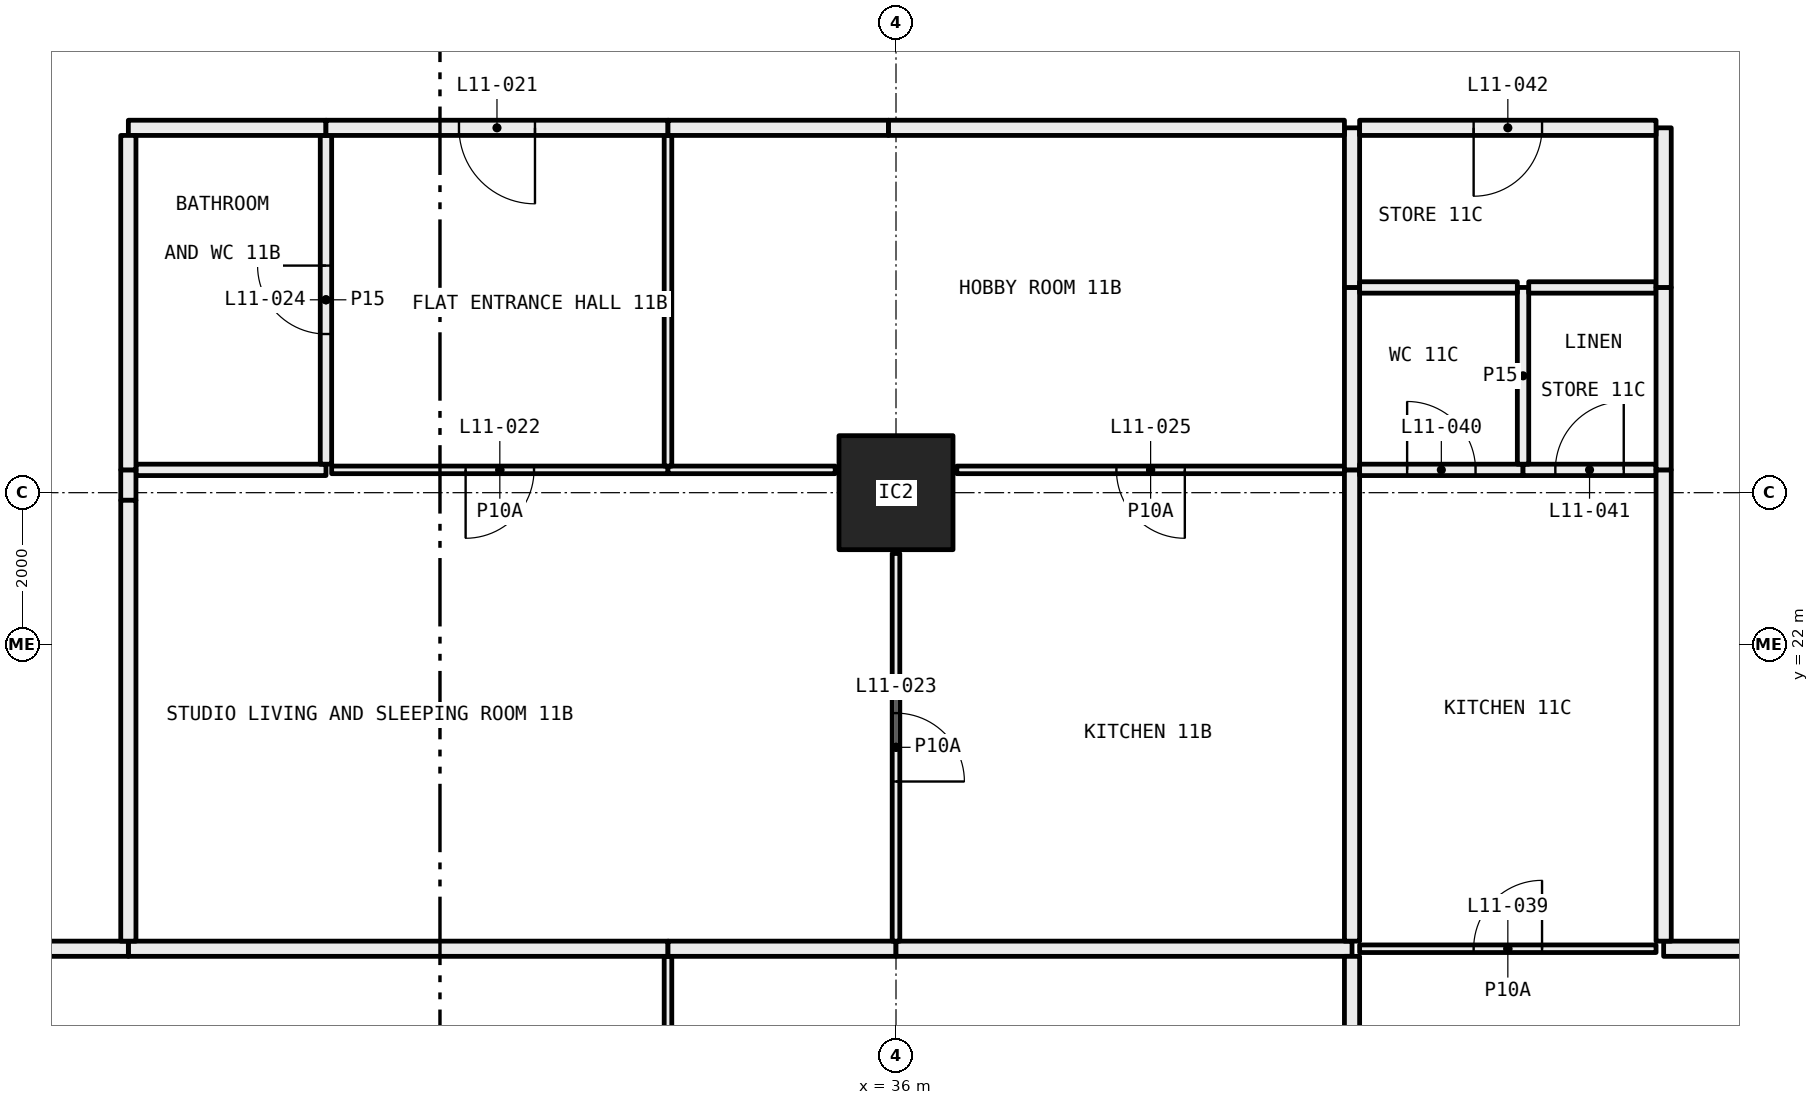
"""IFC4 building model, lengths in metres.
Left out: names, types, materials, properties, quantities, classifications, styles, units other than length and angle.
Written with IfcOpenShell. Run it as: python <this file> out.ifc"""

import sys

from ifc_helpers import new_model, si_unit, direction, frame, frame_2d, origin, origin_2d, place, context, subcontext, project, spatial, rectangle, hollow_rectangle, extrude, element, fill, save


model = new_model("IFC4")
c1 = context("Model", 3, precision=1e-05, world=origin(), true_north=direction((0.0, 1.0)))
c2 = subcontext(c1, "Body", "Model", "MODEL_VIEW")
j1 = project(units=[si_unit("LENGTHUNIT", "METRE"), si_unit("PLANEANGLEUNIT", "RADIAN")], contexts=[c1])
p1 = place(None, origin())
s1 = spatial("IfcSite", under=j1, at=p1, CompositionType="ELEMENT")
p2 = place(p1, origin())
s2 = spatial("IfcBuilding", under=s1, at=p2, CompositionType="ELEMENT")
p3 = place(p2, frame((0.0, 0.0, 50.7)))
s3 = spatial("IfcBuildingStorey", under=s2, at=p3, CompositionType="ELEMENT", Elevation=50.7)
p4 = place(p3, frame((36.0, 24.0, 0.0), z_axis=(0.0, 0.0, 1.0), x_axis=(1.0, 0.0, 0.0)))
e1 = element("IfcColumn", 1, at=p4, inside=s3, PredefinedType="COLUMN", context=c2, shape_type="SweptSolid", body=[
    extrude(hollow_rectangle(XDim=1.5, YDim=1.5, WallThickness=0.065, at=origin_2d()), origin(), (0.0, 0.0, 1.0), 3.05),
])
p5 = place(p3, frame((33.0, 12.05, 0.0), z_axis=(0.0, 0.0, 1.0), x_axis=(0.0, 1.0, 0.0)))
e2 = element("IfcWall", 2, at=p5, inside=s3, PredefinedType="PARTITIONING", context=c2, shape_type="SweptSolid", body=[
    extrude(rectangle(XDim=5.85, YDim=0.1, at=frame_2d((2.925, 0.0))), origin(), (0.0, 0.0, 1.0), 2.45),
])
p6 = place(p3, frame((33.0, 18.0, 0.0), z_axis=(0.0, 0.0, 1.0), x_axis=(-1.0, 0.0, 0.0)))
e3 = element("IfcWall", 3, at=p6, inside=s3, PredefinedType="PARTITIONING", context=c2, shape_type="SweptSolid", body=[
    extrude(rectangle(XDim=7.1, YDim=0.2, at=frame_2d((3.55, 0.0))), origin(), (0.0, 0.0, 1.0), 3.05),
])
p7 = place(p3, frame((25.9, 18.0, 0.0), z_axis=(0.0, 0.0, 1.0), x_axis=(-1.0, 0.0, 0.0)))
e4 = element("IfcWall", 4, at=p7, inside=s3, PredefinedType="PARTITIONING", context=c2, shape_type="SweptSolid", body=[
    extrude(rectangle(XDim=1.9, YDim=0.2, at=frame_2d((0.95, 0.0))), origin(), (0.0, 0.0, 1.0), 3.05),
])
p8 = place(p3, frame((36.0, 18.0, 0.0), z_axis=(0.0, 0.0, 1.0), x_axis=(-1.0, 0.0, 0.0)))
e5 = element("IfcWall", 5, at=p8, inside=s3, PredefinedType="PARTITIONING", context=c2, shape_type="SweptSolid", body=[
    extrude(rectangle(XDim=3.0, YDim=0.2, at=frame_2d((1.5, 0.0))), origin(), (0.0, 0.0, 1.0), 2.45),
])
p9 = place(p3, frame((42.0, 18.0, 0.0), z_axis=(0.0, 0.0, 1.0), x_axis=(-1.0, 0.0, 0.0)))
e6 = element("IfcWall", 6, at=p9, inside=s3, PredefinedType="PARTITIONING", context=c2, shape_type="SweptSolid", body=[
    extrude(rectangle(XDim=6.0, YDim=0.2, at=frame_2d((3.0, 0.0))), origin(), (0.0, 0.0, 1.0), 2.45),
])
p10 = place(p3, frame((42.0, 12.0, 0.0), z_axis=(0.0, 0.0, 1.0), x_axis=(0.0, 1.0, 0.0)))
e7 = element("IfcWall", 7, at=p10, inside=s3, PredefinedType="PARTITIONING", context=c2, shape_type="SweptSolid", body=[
    extrude(rectangle(XDim=5.9, YDim=0.2, at=frame_2d((2.95, 0.0))), origin(), (0.0, 0.0, 1.0), 2.45),
])
p11 = place(p3, frame((36.0, 18.1, 0.0), z_axis=(0.0, 0.0, 1.0), x_axis=(0.0, 1.0, 0.0)))
e8 = element("IfcWall", 8, at=p11, inside=s3, PredefinedType="PARTITIONING", context=c2, shape_type="SweptSolid", body=[
    extrude(rectangle(XDim=5.1, YDim=0.1, at=frame_2d((2.55, 0.0))), origin(), (0.0, 0.0, 1.0), 2.45),
])
p12 = place(p11, frame((2.1, 0.0, 0.0)))
e9 = element("IfcOpeningElement", 9, at=p12, cuts=e8, PredefinedType="OPENING", context=c2, shape_type="SweptSolid", body=[
    extrude(rectangle(XDim=0.9, YDim=2.1, at=frame_2d((0.45, 1.05))), frame((0.0, 0.06, 0.0), z_axis=(0.0, -1.0, 0.0), x_axis=(1.0, 0.0, 0.0)), (0.0, 0.0, 1.0), 0.12),
])
p13 = place(p3, frame((28.5, 24.3, 0.0), z_axis=(0.0, 0.0, 1.0), x_axis=(-1.0, 0.0, 0.0)))
e10 = element("IfcWall", 10, at=p13, inside=s3, PredefinedType="PARTITIONING", context=c2, shape_type="SweptSolid", body=[
    extrude(rectangle(XDim=2.5, YDim=0.15, at=frame_2d((1.25, 0.0))), origin(), (0.0, 0.0, 1.0), 3.05),
])
p14 = place(p3, frame((33.0, 24.3, 0.0), z_axis=(0.0, 0.0, 1.0), x_axis=(-1.0, 0.0, 0.0)))
e11 = element("IfcWall", 11, at=p14, inside=s3, PredefinedType="PARTITIONING", context=c2, shape_type="SweptSolid", body=[
    extrude(rectangle(XDim=4.425, YDim=0.1, at=frame_2d((2.212, 0.0))), origin(), (0.0, 0.0, 1.0), 3.05),
])
p15 = place(p14, frame((1.762, 0.0, 0.0)))
e12 = element("IfcOpeningElement", 12, at=p15, cuts=e11, PredefinedType="OPENING", context=c2, shape_type="SweptSolid", body=[
    extrude(rectangle(XDim=0.9, YDim=2.1, at=frame_2d((0.45, 1.05))), frame((0.0, 0.06, 0.0), z_axis=(0.0, -1.0, 0.0), x_axis=(1.0, 0.0, 0.0)), (0.0, 0.0, 1.0), 0.12),
])
p16 = place(p3, frame((35.2, 24.3, 0.0), z_axis=(0.0, 0.0, 1.0), x_axis=(-1.0, 0.0, 0.0)))
e13 = element("IfcWall", 13, at=p16, inside=s3, PredefinedType="PARTITIONING", context=c2, shape_type="SweptSolid", body=[
    extrude(rectangle(XDim=2.2, YDim=0.1, at=frame_2d((1.1, 0.0))), origin(), (0.0, 0.0, 1.0), 3.05),
])
p17 = place(p3, frame((25.9, 24.3, 0.0), z_axis=(0.0, 0.0, 1.0), x_axis=(0.0, -1.0, 0.0)))
e14 = element("IfcWall", 14, at=p17, inside=s3, PredefinedType="PARTITIONING", context=c2, shape_type="SweptSolid", body=[
    extrude(rectangle(XDim=0.4, YDim=0.2, at=frame_2d((0.2, 0.0))), origin(), (0.0, 0.0, 1.0), 2.45),
])
p18 = place(p3, frame((25.9, 23.9, 0.0), z_axis=(0.0, 0.0, 1.0), x_axis=(0.0, -1.0, 0.0)))
e15 = element("IfcWall", 15, at=p18, inside=s3, PredefinedType="PARTITIONING", context=c2, shape_type="SweptSolid", body=[
    extrude(rectangle(XDim=5.8, YDim=0.2, at=frame_2d((2.9, 0.0))), origin(), (0.0, 0.0, 1.0), 3.05),
])
p19 = place(p3, frame((41.9, 24.3, 0.0), z_axis=(0.0, 0.0, 1.0), x_axis=(-1.0, 0.0, 0.0)))
e16 = element("IfcWall", 16, at=p19, inside=s3, PredefinedType="PARTITIONING", context=c2, shape_type="SweptSolid", body=[
    extrude(rectangle(XDim=5.1, YDim=0.1, at=frame_2d((2.55, 0.0))), origin(), (0.0, 0.0, 1.0), 3.05),
])
p20 = place(p19, frame((2.1, 0.0, 0.0)))
e17 = element("IfcOpeningElement", 17, at=p20, cuts=e16, PredefinedType="OPENING", context=c2, shape_type="SweptSolid", body=[
    extrude(rectangle(XDim=0.9, YDim=2.1, at=frame_2d((0.45, 1.05))), frame((0.0, 0.06, 0.0), z_axis=(0.0, -1.0, 0.0), x_axis=(1.0, 0.0, 0.0)), (0.0, 0.0, 1.0), 0.12),
])
p21 = place(p3, frame((42.0, 18.1, 0.0), z_axis=(0.0, 0.0, 1.0), x_axis=(0.0, 1.0, 0.0)))
e18 = element("IfcWall", 18, at=p21, inside=s3, PredefinedType="PARTITIONING", context=c2, shape_type="SweptSolid", body=[
    extrude(rectangle(XDim=6.2, YDim=0.2, at=frame_2d((3.1, 0.0))), origin(), (0.0, 0.0, 1.0), 2.45),
])
p22 = place(p3, frame((28.5, 24.375, 0.0), z_axis=(0.0, 0.0, 1.0), x_axis=(0.0, 1.0, 0.0)))
e19 = element("IfcWall", 19, at=p22, inside=s3, PredefinedType="PARTITIONING", context=c2, shape_type="SweptSolid", body=[
    extrude(rectangle(XDim=4.325, YDim=0.15, at=frame_2d((2.163, 0.0))), origin(), (0.0, 0.0, 1.0), 3.05),
])
p23 = place(p22, frame((1.712, 0.0, 0.0)))
e20 = element("IfcOpeningElement", 20, at=p23, cuts=e19, PredefinedType="OPENING", context=c2, shape_type="SweptSolid", body=[
    extrude(rectangle(XDim=0.9, YDim=2.1, at=frame_2d((0.45, 1.05))), frame((0.0, 0.085, 0.0), z_axis=(0.0, -1.0, 0.0), x_axis=(1.0, 0.0, 0.0)), (0.0, 0.0, 1.0), 0.17),
])
p24 = place(p3, frame((28.5, 28.8, 0.0), z_axis=(0.0, 0.0, 1.0), x_axis=(-1.0, 0.0, 0.0)))
e21 = element("IfcWall", 21, at=p24, inside=s3, PredefinedType="PARTITIONING", context=c2, shape_type="SweptSolid", body=[
    extrude(rectangle(XDim=2.6, YDim=0.2, at=frame_2d((1.3, 0.0))), origin(), (0.0, 0.0, 1.0), 3.05),
])
p25 = place(p3, frame((25.9, 28.7, 0.0), z_axis=(0.0, 0.0, 1.0), x_axis=(0.0, -1.0, 0.0)))
e22 = element("IfcWall", 22, at=p25, inside=s3, PredefinedType="PARTITIONING", context=c2, shape_type="SweptSolid", body=[
    extrude(rectangle(XDim=4.4, YDim=0.2, at=frame_2d((2.2, 0.0))), origin(), (0.0, 0.0, 1.0), 3.05),
])
p26 = place(p3, frame((33.0, 24.35, 0.0), z_axis=(0.0, 0.0, 1.0), x_axis=(0.0, 1.0, 0.0)))
e23 = element("IfcWall", 23, at=p26, inside=s3, PredefinedType="PARTITIONING", context=c2, shape_type="SweptSolid", body=[
    extrude(rectangle(XDim=4.35, YDim=0.1, at=frame_2d((2.175, 0.0))), origin(), (0.0, 0.0, 1.0), 3.05),
])
p27 = place(p3, frame((33.0, 28.8, 0.0), z_axis=(0.0, 0.0, 1.0), x_axis=(-1.0, 0.0, 0.0)))
e24 = element("IfcWall", 24, at=p27, inside=s3, PredefinedType="PARTITIONING", context=c2, shape_type="SweptSolid", body=[
    extrude(rectangle(XDim=4.5, YDim=0.2, at=frame_2d((2.25, 0.0))), origin(), (0.0, 0.0, 1.0), 3.05),
])
p28 = place(p27, frame((1.75, 0.0, 0.0)))
e25 = element("IfcOpeningElement", 25, at=p28, cuts=e24, PredefinedType="OPENING", context=c2, shape_type="SweptSolid", body=[
    extrude(rectangle(XDim=1.0, YDim=2.1, at=frame_2d((0.5, 1.05))), frame((0.0, 0.11, 0.0), z_axis=(0.0, -1.0, 0.0), x_axis=(1.0, 0.0, 0.0)), (0.0, 0.0, 1.0), 0.22),
])
p29 = place(p3, frame((42.0, 24.3, 0.0), z_axis=(0.0, 0.0, 1.0), x_axis=(0.0, 1.0, 0.0)))
e26 = element("IfcWall", 26, at=p29, inside=s3, PredefinedType="PARTITIONING", context=c2, shape_type="SweptSolid", body=[
    extrude(rectangle(XDim=2.4, YDim=0.2, at=frame_2d((1.2, 0.0))), origin(), (0.0, 0.0, 1.0), 3.05),
])
p30 = place(p3, frame((42.0, 26.7, 0.0), z_axis=(0.0, 0.0, 1.0), x_axis=(0.0, 1.0, 0.0)))
e27 = element("IfcWall", 27, at=p30, inside=s3, PredefinedType="PARTITIONING", context=c2, shape_type="SweptSolid", body=[
    extrude(rectangle(XDim=2.1, YDim=0.2, at=frame_2d((1.05, 0.0))), origin(), (0.0, 0.0, 1.0), 3.05),
])
p31 = place(p3, frame((41.9, 28.8, 0.0), z_axis=(0.0, 0.0, 1.0), x_axis=(-1.0, 0.0, 0.0)))
e28 = element("IfcWall", 28, at=p31, inside=s3, PredefinedType="PARTITIONING", context=c2, shape_type="SweptSolid", body=[
    extrude(rectangle(XDim=6.0, YDim=0.2, at=frame_2d((3.0, 0.0))), origin(), (0.0, 0.0, 1.0), 2.45),
])
p32 = place(p3, frame((35.9, 28.8, 0.0), z_axis=(0.0, 0.0, 1.0), x_axis=(-1.0, 0.0, 0.0)))
e29 = element("IfcWall", 29, at=p32, inside=s3, PredefinedType="PARTITIONING", context=c2, shape_type="SweptSolid", body=[
    extrude(rectangle(XDim=2.9, YDim=0.2, at=frame_2d((1.45, 0.0))), origin(), (0.0, 0.0, 1.0), 3.05),
])
p33 = place(p3, frame((46.0, 18.0, 0.0), z_axis=(0.0, 0.0, 1.0), x_axis=(-1.0, 0.0, 0.0)))
e30 = element("IfcWall", 30, at=p33, inside=s3, PredefinedType="PARTITIONING", context=c2, shape_type="SweptSolid", body=[
    extrude(rectangle(XDim=3.9, YDim=0.1, at=frame_2d((1.95, 0.0))), origin(), (0.0, 0.0, 1.0), 3.05),
])
p34 = place(p33, frame((1.5, 0.0, 0.0)))
e31 = element("IfcOpeningElement", 31, at=p34, cuts=e30, PredefinedType="OPENING", context=c2, shape_type="SweptSolid", body=[
    extrude(rectangle(XDim=0.9, YDim=2.1, at=frame_2d((0.45, 1.05))), frame((0.0, 0.06, 0.0), z_axis=(0.0, -1.0, 0.0), x_axis=(1.0, 0.0, 0.0)), (0.0, 0.0, 1.0), 0.12),
])
p35 = place(p3, frame((52.5, 18.0, 0.0), z_axis=(0.0, 0.0, 1.0), x_axis=(-1.0, 0.0, 0.0)))
e32 = element("IfcWall", 32, at=p35, inside=s3, PredefinedType="PARTITIONING", context=c2, shape_type="SweptSolid", body=[
    extrude(rectangle(XDim=6.4, YDim=0.2, at=frame_2d((3.2, 0.0))), origin(), (0.0, 0.0, 1.0), 3.05),
])
p36 = place(p3, frame((44.25, 24.3, 0.0), z_axis=(0.0, 0.0, 1.0), x_axis=(-1.0, 0.0, 0.0)))
e33 = element("IfcWall", 33, at=p36, inside=s3, PredefinedType="PARTITIONING", context=c2, shape_type="SweptSolid", body=[
    extrude(rectangle(XDim=2.15, YDim=0.15, at=frame_2d((1.075, 0.0))), origin(), (0.0, 0.0, 1.0), 3.05),
])
p37 = place(p36, frame((0.625, 0.0, 0.0)))
e34 = element("IfcOpeningElement", 34, at=p37, cuts=e33, PredefinedType="OPENING", context=c2, shape_type="SweptSolid", body=[
    extrude(rectangle(XDim=0.9, YDim=2.1, at=frame_2d((0.45, 1.05))), frame((0.0, 0.085, 0.0), z_axis=(0.0, -1.0, 0.0), x_axis=(1.0, 0.0, 0.0)), (0.0, 0.0, 1.0), 0.17),
])
p38 = place(p3, frame((46.0, 24.3, 0.0), z_axis=(0.0, 0.0, 1.0), x_axis=(-1.0, 0.0, 0.0)))
e35 = element("IfcWall", 35, at=p38, inside=s3, PredefinedType="PARTITIONING", context=c2, shape_type="SweptSolid", body=[
    extrude(rectangle(XDim=1.75, YDim=0.15, at=frame_2d((0.875, 0.0))), origin(), (0.0, 0.0, 1.0), 3.05),
])
p39 = place(p38, frame((0.425, 0.0, 0.0)))
e36 = element("IfcOpeningElement", 36, at=p39, cuts=e35, PredefinedType="OPENING", context=c2, shape_type="SweptSolid", body=[
    extrude(rectangle(XDim=0.9, YDim=2.1, at=frame_2d((0.45, 1.05))), frame((0.0, 0.085, 0.0), z_axis=(0.0, -1.0, 0.0), x_axis=(1.0, 0.0, 0.0)), (0.0, 0.0, 1.0), 0.17),
])
p40 = place(p3, frame((46.1, 18.1, 0.0), z_axis=(0.0, 0.0, 1.0), x_axis=(0.0, 1.0, 0.0)))
e37 = element("IfcWall", 37, at=p40, inside=s3, PredefinedType="PARTITIONING", context=c2, shape_type="SweptSolid", body=[
    extrude(rectangle(XDim=6.2, YDim=0.2, at=frame_2d((3.1, 0.0))), origin(), (0.0, 0.0, 1.0), 2.45),
])
p41 = place(p3, frame((44.25, 24.375, 0.0), z_axis=(0.0, 0.0, 1.0), x_axis=(0.0, 1.0, 0.0)))
e38 = element("IfcWall", 38, at=p41, inside=s3, PredefinedType="PARTITIONING", context=c2, shape_type="SweptSolid", body=[
    extrude(rectangle(XDim=2.325, YDim=0.15, at=frame_2d((1.163, 0.0))), origin(), (0.0, 0.0, 1.0), 3.05),
])
p42 = place(p3, frame((44.175, 26.7, 0.0), z_axis=(0.0, 0.0, 1.0), x_axis=(-1.0, 0.0, 0.0)))
e39 = element("IfcWall", 39, at=p42, inside=s3, PredefinedType="PARTITIONING", context=c2, shape_type="SweptSolid", body=[
    extrude(rectangle(XDim=2.075, YDim=0.15, at=frame_2d((1.038, 0.0))), origin(), (0.0, 0.0, 1.0), 3.05),
])
p43 = place(p3, frame((46.0, 26.7, 0.0), z_axis=(0.0, 0.0, 1.0), x_axis=(-1.0, 0.0, 0.0)))
e40 = element("IfcWall", 40, at=p43, inside=s3, PredefinedType="PARTITIONING", context=c2, shape_type="SweptSolid", body=[
    extrude(rectangle(XDim=1.675, YDim=0.15, at=frame_2d((0.837, 0.0))), origin(), (0.0, 0.0, 1.0), 3.05),
])
p44 = place(p3, frame((46.1, 24.3, 0.0), z_axis=(0.0, 0.0, 1.0), x_axis=(0.0, 1.0, 0.0)))
e41 = element("IfcWall", 41, at=p44, inside=s3, PredefinedType="PARTITIONING", context=c2, shape_type="SweptSolid", body=[
    extrude(rectangle(XDim=2.4, YDim=0.2, at=frame_2d((1.2, 0.0))), origin(), (0.0, 0.0, 1.0), 3.05),
])
p45 = place(p3, frame((46.1, 26.7, 0.0), z_axis=(0.0, 0.0, 1.0), x_axis=(0.0, 1.0, 0.0)))
e42 = element("IfcWall", 42, at=p45, inside=s3, PredefinedType="PARTITIONING", context=c2, shape_type="SweptSolid", body=[
    extrude(rectangle(XDim=2.1, YDim=0.2, at=frame_2d((1.05, 0.0))), origin(), (0.0, 0.0, 1.0), 3.05),
])
p46 = place(p3, frame((46.0, 28.8, 0.0), z_axis=(0.0, 0.0, 1.0), x_axis=(-1.0, 0.0, 0.0)))
e43 = element("IfcWall", 43, at=p46, inside=s3, PredefinedType="PARTITIONING", context=c2, shape_type="SweptSolid", body=[
    extrude(rectangle(XDim=3.9, YDim=0.2, at=frame_2d((1.95, 0.0))), origin(), (0.0, 0.0, 1.0), 3.05),
])
p47 = place(p46, frame((1.5, 0.0, 0.0)))
e44 = element("IfcOpeningElement", 44, at=p47, cuts=e43, PredefinedType="OPENING", context=c2, shape_type="SweptSolid", body=[
    extrude(rectangle(XDim=0.9, YDim=2.1, at=frame_2d((0.45, 1.05))), frame((0.0, 0.11, 0.0), z_axis=(0.0, -1.0, 0.0), x_axis=(1.0, 0.0, 0.0)), (0.0, 0.0, 1.0), 0.22),
])
p48 = place(p28, origin())
e45 = element("IfcDoor", 45, at=p48, inside=s3, OperationType="SINGLE_SWING_RIGHT", PredefinedType="DOOR", context=c2, shape_type="SweptSolid", body=[
    extrude(rectangle(XDim=1.0, YDim=2.1, at=frame_2d((0.5, 1.05))), frame((0.0, 0.025, 0.0), z_axis=(0.0, -1.0, 0.0), x_axis=(1.0, 0.0, 0.0)), (0.0, 0.0, 1.0), 0.05),
])
fill(e25, e45)
p49 = place(p15, origin())
e46 = element("IfcDoor", 46, at=p49, inside=s3, OperationType="SINGLE_SWING_LEFT", PredefinedType="DOOR", context=c2, shape_type="SweptSolid", body=[
    extrude(rectangle(XDim=0.9, YDim=2.1, at=frame_2d((0.45, 1.05))), frame((0.0, 0.025, 0.0), z_axis=(0.0, -1.0, 0.0), x_axis=(1.0, 0.0, 0.0)), (0.0, 0.0, 1.0), 0.05),
])
fill(e12, e46)
p50 = place(p12, frame((0.9, 0.0, 0.0), x_axis=(-1.0, 0.0, 0.0)))
e47 = element("IfcDoor", 47, at=p50, inside=s3, OperationType="SINGLE_SWING_LEFT", PredefinedType="DOOR", context=c2, shape_type="SweptSolid", body=[
    extrude(rectangle(XDim=0.9, YDim=2.1, at=frame_2d((0.45, 1.05))), frame((0.0, 0.025, 0.0), z_axis=(0.0, -1.0, 0.0), x_axis=(1.0, 0.0, 0.0)), (0.0, 0.0, 1.0), 0.05),
])
fill(e9, e47)
p51 = place(p23, origin())
e48 = element("IfcDoor", 48, at=p51, inside=s3, OperationType="SINGLE_SWING_LEFT", PredefinedType="DOOR", context=c2, shape_type="SweptSolid", body=[
    extrude(rectangle(XDim=0.9, YDim=2.1, at=frame_2d((0.45, 1.05))), frame((0.0, 0.025, 0.0), z_axis=(0.0, -1.0, 0.0), x_axis=(1.0, 0.0, 0.0)), (0.0, 0.0, 1.0), 0.05),
])
fill(e20, e48)
p52 = place(p20, origin())
e49 = element("IfcDoor", 49, at=p52, inside=s3, OperationType="SINGLE_SWING_RIGHT", PredefinedType="DOOR", context=c2, shape_type="SweptSolid", body=[
    extrude(rectangle(XDim=0.9, YDim=2.1, at=frame_2d((0.45, 1.05))), frame((0.0, 0.025, 0.0), z_axis=(0.0, -1.0, 0.0), x_axis=(1.0, 0.0, 0.0)), (0.0, 0.0, 1.0), 0.05),
])
fill(e17, e49)
p53 = place(p34, frame((0.9, 0.0, 0.0), x_axis=(-1.0, 0.0, 0.0)))
e50 = element("IfcDoor", 50, at=p53, inside=s3, OperationType="SINGLE_SWING_LEFT", PredefinedType="DOOR", context=c2, shape_type="SweptSolid", body=[
    extrude(rectangle(XDim=0.9, YDim=2.1, at=frame_2d((0.45, 1.05))), frame((0.0, 0.025, 0.0), z_axis=(0.0, -1.0, 0.0), x_axis=(1.0, 0.0, 0.0)), (0.0, 0.0, 1.0), 0.05),
])
fill(e31, e50)
p54 = place(p37, frame((0.9, 0.0, 0.0), x_axis=(-1.0, 0.0, 0.0)))
e51 = element("IfcDoor", 51, at=p54, inside=s3, OperationType="SINGLE_SWING_RIGHT", PredefinedType="DOOR", context=c2, shape_type="SweptSolid", body=[
    extrude(rectangle(XDim=0.9, YDim=2.1, at=frame_2d((0.45, 1.05))), frame((0.0, 0.025, 0.0), z_axis=(0.0, -1.0, 0.0), x_axis=(1.0, 0.0, 0.0)), (0.0, 0.0, 1.0), 0.05),
])
fill(e34, e51)
p55 = place(p39, frame((0.9, 0.0, 0.0), x_axis=(-1.0, 0.0, 0.0)))
e52 = element("IfcDoor", 52, at=p55, inside=s3, OperationType="SINGLE_SWING_LEFT", PredefinedType="DOOR", context=c2, shape_type="SweptSolid", body=[
    extrude(rectangle(XDim=0.9, YDim=2.1, at=frame_2d((0.45, 1.05))), frame((0.0, 0.025, 0.0), z_axis=(0.0, -1.0, 0.0), x_axis=(1.0, 0.0, 0.0)), (0.0, 0.0, 1.0), 0.05),
])
fill(e36, e52)
p56 = place(p47, origin())
e53 = element("IfcDoor", 53, at=p56, inside=s3, OperationType="SINGLE_SWING_LEFT", PredefinedType="DOOR", context=c2, shape_type="SweptSolid", body=[
    extrude(rectangle(XDim=0.9, YDim=2.1, at=frame_2d((0.45, 1.05))), frame((0.0, 0.025, 0.0), z_axis=(0.0, -1.0, 0.0), x_axis=(1.0, 0.0, 0.0)), (0.0, 0.0, 1.0), 0.05),
])
fill(e44, e53)
save(model, sys.argv[1])
